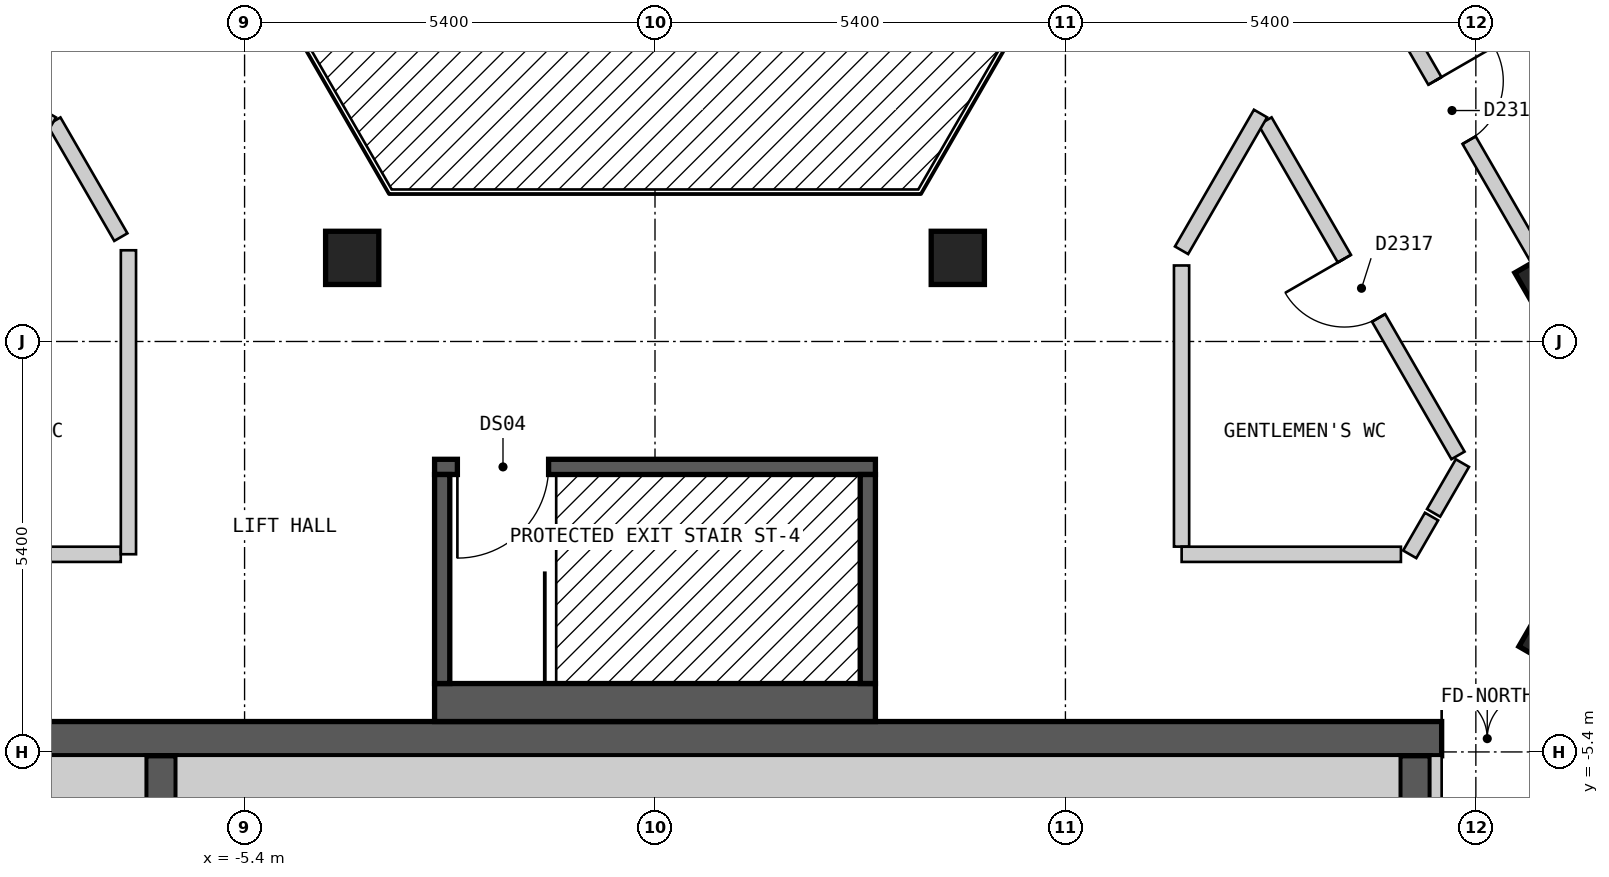
"""IFC4 building model, lengths in metres.
Left out: names, types, materials, properties, quantities, classifications, styles, units other than length and angle.
Written with IfcOpenShell. Run it as: python <this file> out.ifc"""

import sys

from ifc_helpers import new_model, si_unit, direction, frame, frame_2d, origin, origin_2d, place, context, subcontext, project, spatial, rectangle, extrude, element, fill, save


model = new_model("IFC4")
c1 = context("Model", 3, precision=1e-05, world=origin(), true_north=direction((0.0, 1.0)))
c2 = subcontext(c1, "Body", "Model", "MODEL_VIEW")
j1 = project(units=[si_unit("LENGTHUNIT", "METRE"), si_unit("PLANEANGLEUNIT", "RADIAN")], contexts=[c1])
p1 = place(None, origin())
s1 = spatial("IfcSite", under=j1, at=p1, CompositionType="ELEMENT")
p2 = place(p1, origin())
s2 = spatial("IfcBuilding", under=s1, at=p2, CompositionType="ELEMENT")
p3 = place(p2, frame((0.0, 0.0, 241.8)))
s3 = spatial("IfcBuildingStorey", under=s2, at=p3, CompositionType="ELEMENT", Elevation=241.8)
for number, where, z_axis, x_axis in (
    (1, (11.845, -3.884, 0.0), (0.0, 0.0, 1.0), (0.5, 0.866, 0.0)),
    (2, (11.792, 0.775, 0.0), (0.0, 0.0, 1.0), (-0.5, 0.866, 0.0)),
    (3, (3.984, 1.1, 0.0), (0.0, 0.0, 1.0), (1.0, 0.0, 0.0)),
    (4, (-3.984, 1.1, 0.0), (0.0, 0.0, 1.0), (1.0, 0.0, 0.0)),
):
    element("IfcColumn", number, at=place(p3, frame(where, z_axis=z_axis, x_axis=x_axis)), inside=s3, PredefinedType="COLUMN", context=c2, shape_type="SweptSolid", body=[
        extrude(rectangle(XDim=0.7, YDim=0.7, at=origin_2d()), origin(), (0.0, 0.0, 1.0), 3.0),
    ])
p4 = place(p3, frame((-13.3, -5.225, 0.0), z_axis=(0.0, 0.0, 1.0), x_axis=(1.0, 0.0, 0.0)))
e5 = element("IfcWall", 5, at=p4, inside=s3, PredefinedType="SHEAR", context=c2, shape_type="SweptSolid", body=[
    extrude(rectangle(XDim=26.6, YDim=0.45, at=frame_2d((13.3, 0.0))), origin(), (0.0, 0.0, 1.0), 2.2),
])
p5 = place(p4, frame((23.65, 0.0, 0.0)))
e6 = element("IfcOpeningElement", 6, at=p5, cuts=e5, PredefinedType="OPENING", context=c2, shape_type="SweptSolid", body=[
    extrude(rectangle(XDim=1.2, YDim=2.1, at=frame_2d((0.6, 1.05))), frame((0.0, 0.235, 0.0), z_axis=(0.0, -1.0, 0.0), x_axis=(1.0, 0.0, 0.0)), (0.0, 0.0, 1.0), 0.47),
])
for number, where, z_axis, x_axis in (
    (7, (-6.5, -9.15, 0.0), (0.0, 0.0, 1.0), (0.0, 1.0, 0.0)),
    (8, (10.0, -9.15, 0.0), (0.0, 0.0, 1.0), (0.0, 1.0, 0.0)),
):
    element("IfcWall", number, at=place(p3, frame(where, z_axis=z_axis, x_axis=x_axis)), inside=s3, PredefinedType="SHEAR", context=c2, shape_type="SweptSolid", body=[
        extrude(rectangle(XDim=3.7, YDim=0.4, at=frame_2d((1.85, 0.0))), origin(), (0.0, 0.0, 1.0), 2.2),
    ])
p6 = place(p3, frame((-2.9, -4.75, 0.0), z_axis=(0.0, 0.0, 1.0), x_axis=(1.0, 0.0, 0.0)))
e9 = element("IfcWall", 9, at=p6, inside=s3, PredefinedType="SOLIDWALL", context=c2, shape_type="SweptSolid", body=[
    extrude(rectangle(XDim=5.8, YDim=0.5, at=frame_2d((2.9, 0.0))), origin(), (0.0, 0.0, 1.0), 2.2),
])
p7 = place(p3, frame((-2.9, -1.65, 0.0), z_axis=(0.0, 0.0, 1.0), x_axis=(1.0, 0.0, 0.0)))
e10 = element("IfcWall", 10, at=p7, inside=s3, PredefinedType="SOLIDWALL", context=c2, shape_type="SweptSolid", body=[
    extrude(rectangle(XDim=5.8, YDim=0.2, at=frame_2d((2.9, 0.0))), origin(), (0.0, 0.0, 1.0), 2.2),
])
p8 = place(p7, frame((0.3, 0.0, 0.0)))
e11 = element("IfcOpeningElement", 11, at=p8, cuts=e10, PredefinedType="OPENING", context=c2, shape_type="SweptSolid", body=[
    extrude(rectangle(XDim=1.2, YDim=2.1, at=frame_2d((0.6, 1.05))), frame((0.0, 0.11, 0.0), z_axis=(0.0, -1.0, 0.0), x_axis=(1.0, 0.0, 0.0)), (0.0, 0.0, 1.0), 0.22),
])
for number, where, z_axis, x_axis in (
    (12, (-2.8, -4.5, 0.0), (0.0, 0.0, 1.0), (0.0, 1.0, 0.0)),
    (13, (2.8, -4.5, 0.0), (0.0, 0.0, 1.0), (0.0, 1.0, 0.0)),
):
    element("IfcWall", number, at=place(p3, frame(where, z_axis=z_axis, x_axis=x_axis)), inside=s3, PredefinedType="SOLIDWALL", context=c2, shape_type="SweptSolid", body=[
        extrude(rectangle(XDim=2.75, YDim=0.2, at=frame_2d((1.375, 0.0))), origin(), (0.0, 0.0, 1.0), 2.2),
    ])
p9 = place(p3, frame((-7.909, 2.898, 0.0), z_axis=(0.0, 0.0, 1.0), x_axis=(0.50019444547, -0.865913111531, 0.0)))
e14 = element("IfcWall", 14, at=p9, inside=s3, PredefinedType="PARTITIONING", context=c2, shape_type="SweptSolid", body=[
    extrude(rectangle(XDim=1.761, YDim=0.2, at=frame_2d((0.88, 0.0))), origin(), (0.0, 0.0, 1.0), 2.2),
])
p10 = place(p3, frame((8.026, 2.899, 0.0), z_axis=(0.0, 0.0, 1.0), x_axis=(0.499986018985, -0.866033475577, 0.0)))
e15 = element("IfcWall", 15, at=p10, inside=s3, PredefinedType="PARTITIONING", context=c2, shape_type="SweptSolid", body=[
    extrude(rectangle(XDim=5.078, YDim=0.2, at=frame_2d((2.539, 0.0))), origin(), (0.0, 0.0, 1.0), 2.2),
])
p11 = place(p10, frame((2.089, 0.0, 0.0)))
e16 = element("IfcOpeningElement", 16, at=p11, cuts=e15, PredefinedType="OPENING", context=c2, shape_type="SweptSolid", body=[
    extrude(rectangle(XDim=0.9, YDim=2.1, at=frame_2d((0.45, 1.05))), frame((0.0, 0.11, 0.0), z_axis=(0.0, -1.0, 0.0), x_axis=(1.0, 0.0, 0.0)), (0.0, 0.0, 1.0), 0.22),
])
p12 = place(p3, frame((9.238, 5.2, 0.0), z_axis=(0.0, 0.0, 1.0), x_axis=(0.500025705601, -0.86601056214, 0.0)))
e17 = element("IfcWall", 17, at=p12, inside=s3, PredefinedType="PARTITIONING", context=c2, shape_type="SweptSolid", body=[
    extrude(rectangle(XDim=7.735, YDim=0.2, at=frame_2d((3.868, 0.0))), origin(), (0.0, 0.0, 1.0), 2.2),
])
p13 = place(p12, frame((6.045, 0.0, 0.0)))
e18 = element("IfcOpeningElement", 18, at=p13, cuts=e17, PredefinedType="OPENING", context=c2, shape_type="SweptSolid", body=[
    extrude(rectangle(XDim=0.9, YDim=2.1, at=frame_2d((0.45, 1.05))), frame((0.0, 0.11, 0.0), z_axis=(0.0, -1.0, 0.0), x_axis=(1.0, 0.0, 0.0)), (0.0, 0.0, 1.0), 0.22),
])
p14 = place(p12, frame((2.046, 0.0, 0.0)))
e19 = element("IfcOpeningElement", 19, at=p14, cuts=e17, PredefinedType="OPENING", context=c2, shape_type="SweptSolid", body=[
    extrude(rectangle(XDim=0.9, YDim=2.1, at=frame_2d((0.45, 1.05))), frame((0.0, 0.11, 0.0), z_axis=(0.0, -1.0, 0.0), x_axis=(1.0, 0.0, 0.0)), (0.0, 0.0, 1.0), 0.22),
])
p15 = place(p3, frame((6.928, 1.0, 0.0), z_axis=(0.0, 0.0, 1.0), x_axis=(0.0, -1.0, 0.0)))
e20 = element("IfcWall", 20, at=p15, inside=s3, PredefinedType="PARTITIONING", context=c2, shape_type="SweptSolid", body=[
    extrude(rectangle(XDim=3.699, YDim=0.2, at=frame_2d((1.85, 0.0))), origin(), (0.0, 0.0, 1.0), 2.2),
])
p16 = place(p3, frame((-9.93, -2.8, 0.0), z_axis=(0.0, 0.0, 1.0), x_axis=(1.0, 0.0, 0.0)))
e21 = element("IfcWall", 21, at=p16, inside=s3, PredefinedType="PARTITIONING", context=c2, shape_type="SweptSolid", body=[
    extrude(rectangle(XDim=2.901, YDim=0.2, at=frame_2d((1.45, 0.0))), origin(), (0.0, 0.0, 1.0), 2.2),
])
p17 = place(p3, frame((6.929, -2.8, 0.0), z_axis=(0.0, 0.0, 1.0), x_axis=(1.0, 0.0, 0.0)))
e22 = element("IfcWall", 22, at=p17, inside=s3, PredefinedType="PARTITIONING", context=c2, shape_type="SweptSolid", body=[
    extrude(rectangle(XDim=2.885, YDim=0.2, at=frame_2d((1.442, 0.0))), origin(), (0.0, 0.0, 1.0), 2.2),
])
p18 = place(p3, frame((6.928, 1.2, 0.0), z_axis=(0.0, 0.0, 1.0), x_axis=(0.500132712588, 0.865948768577, 0.0)))
e23 = element("IfcWall", 23, at=p18, inside=s3, PredefinedType="PARTITIONING", context=c2, shape_type="SweptSolid", body=[
    extrude(rectangle(XDim=2.078, YDim=0.2, at=frame_2d((1.039, 0.0))), origin(), (0.0, 0.0, 1.0), 2.2),
])
p19 = place(p3, frame((9.93, -2.8, 0.0), z_axis=(0.0, 0.0, 1.0), x_axis=(0.500164219654, 0.865930570761, 0.0)))
e24 = element("IfcWall", 24, at=p19, inside=s3, PredefinedType="PARTITIONING", context=c2, shape_type="SweptSolid", body=[
    extrude(rectangle(XDim=0.574, YDim=0.2, at=frame_2d((0.287, 0.0))), origin(), (0.0, 0.0, 1.0), 2.2),
])
p20 = place(p3, frame((10.244, -2.255, 0.0), z_axis=(0.0, 0.0, 1.0), x_axis=(0.50109986513, 0.865389464442, 0.0)))
e25 = element("IfcWall", 25, at=p20, inside=s3, PredefinedType="PARTITIONING", context=c2, shape_type="SweptSolid", body=[
    extrude(rectangle(XDim=0.757, YDim=0.2, at=frame_2d((0.378, 0.0))), origin(), (0.0, 0.0, 1.0), 2.2),
])
p21 = place(p3, frame((-10.623, -1.6, 0.0), z_axis=(0.0, 0.0, 1.0), x_axis=(0.500040865889, 0.866001808567, 0.0)))
e26 = element("IfcWall", 26, at=p21, inside=s3, PredefinedType="PARTITIONING", context=c2, shape_type="SweptSolid", body=[
    extrude(rectangle(XDim=5.31, YDim=0.2, at=frame_2d((2.655, 0.0))), origin(), (0.0, 0.0, 1.0), 2.2),
])
p22 = place(p21, frame((2.205, 0.0, 0.0)))
e27 = element("IfcOpeningElement", 27, at=p22, cuts=e26, PredefinedType="OPENING", context=c2, shape_type="SweptSolid", body=[
    extrude(rectangle(XDim=0.9, YDim=2.1, at=frame_2d((0.45, 1.05))), frame((0.0, 0.11, 0.0), z_axis=(0.0, -1.0, 0.0), x_axis=(1.0, 0.0, 0.0)), (0.0, 0.0, 1.0), 0.22),
])
p23 = place(p3, frame((-6.928, -2.799, 0.0), z_axis=(0.0, 0.0, 1.0), x_axis=(0.0, 1.0, 0.0)))
e28 = element("IfcWall", 28, at=p23, inside=s3, PredefinedType="PARTITIONING", context=c2, shape_type="SweptSolid", body=[
    extrude(rectangle(XDim=3.999, YDim=0.2, at=frame_2d((2.0, 0.0))), origin(), (0.0, 0.0, 1.0), 2.2),
])
p24 = place(p3, frame((-12.1, -5.825, 0.0), z_axis=(0.0, 0.0, 1.0), x_axis=(1.0, 0.0, 0.0)))
e29 = element("IfcWall", 29, at=p24, inside=s3, PredefinedType="SOLIDWALL", context=c2, shape_type="SweptSolid", body=[
    extrude(rectangle(XDim=5.4, YDim=0.75, at=frame_2d((2.7, 0.0))), origin(), (0.0, 0.0, 1.0), 2.2),
])
p25 = place(p3, frame((-6.3, -5.825, 0.0), z_axis=(0.0, 0.0, 1.0), x_axis=(1.0, 0.0, 0.0)))
e30 = element("IfcWall", 30, at=p25, inside=s3, PredefinedType="SOLIDWALL", context=c2, shape_type="SweptSolid", body=[
    extrude(rectangle(XDim=16.1, YDim=0.75, at=frame_2d((8.05, 0.0))), origin(), (0.0, 0.0, 1.0), 2.2),
])
p26 = place(p3, frame((10.275, -6.2, 0.0), z_axis=(0.0, 0.0, 1.0), x_axis=(0.0, 1.0, 0.0)))
e31 = element("IfcWall", 31, at=p26, inside=s3, PredefinedType="PARTITIONING", context=c2, shape_type="SweptSolid", body=[
    extrude(rectangle(XDim=0.75, YDim=0.15, at=frame_2d((0.375, 0.0))), origin(), (0.0, 0.0, 1.0), 2.2),
])
p27 = place(p8, origin())
e32 = element("IfcDoor", 32, at=p27, inside=s3, OperationType="SINGLE_SWING_LEFT", PredefinedType="DOOR", context=c2, shape_type="SweptSolid", body=[
    extrude(rectangle(XDim=1.2, YDim=2.1, at=frame_2d((0.6, 1.05))), frame((0.0, 0.025, 0.0), z_axis=(0.0, -1.0, 0.0), x_axis=(1.0, 0.0, 0.0)), (0.0, 0.0, 1.0), 0.05),
])
fill(e11, e32)
p28 = place(p14, origin())
e33 = element("IfcDoor", 33, at=p28, inside=s3, OperationType="SINGLE_SWING_LEFT", PredefinedType="DOOR", context=c2, shape_type="SweptSolid", body=[
    extrude(rectangle(XDim=0.9, YDim=2.1, at=frame_2d((0.45, 1.05))), frame((0.0, 0.025, 0.0), z_axis=(0.0, -1.0, 0.0), x_axis=(1.0, 0.0, 0.0)), (0.0, 0.0, 1.0), 0.05),
])
fill(e19, e33)
p29 = place(p11, origin())
e34 = element("IfcDoor", 34, at=p29, inside=s3, OperationType="SINGLE_SWING_LEFT", PredefinedType="DOOR", context=c2, shape_type="SweptSolid", body=[
    extrude(rectangle(XDim=0.9, YDim=2.1, at=frame_2d((0.45, 1.05))), frame((0.0, 0.025, 0.0), z_axis=(0.0, -1.0, 0.0), x_axis=(1.0, 0.0, 0.0)), (0.0, 0.0, 1.0), 0.05),
])
fill(e16, e34)
p30 = place(p5, origin())
e35 = element("IfcDoor", 35, at=p30, inside=s3, OperationType="DOUBLE_DOOR_SINGLE_SWING", PredefinedType="DOOR", context=c2, shape_type="SweptSolid", body=[
    extrude(rectangle(XDim=1.2, YDim=2.1, at=frame_2d((0.6, 1.05))), frame((0.0, 0.025, 0.0), z_axis=(0.0, -1.0, 0.0), x_axis=(1.0, 0.0, 0.0)), (0.0, 0.0, 1.0), 0.05),
])
fill(e6, e35)
save(model, sys.argv[1])
